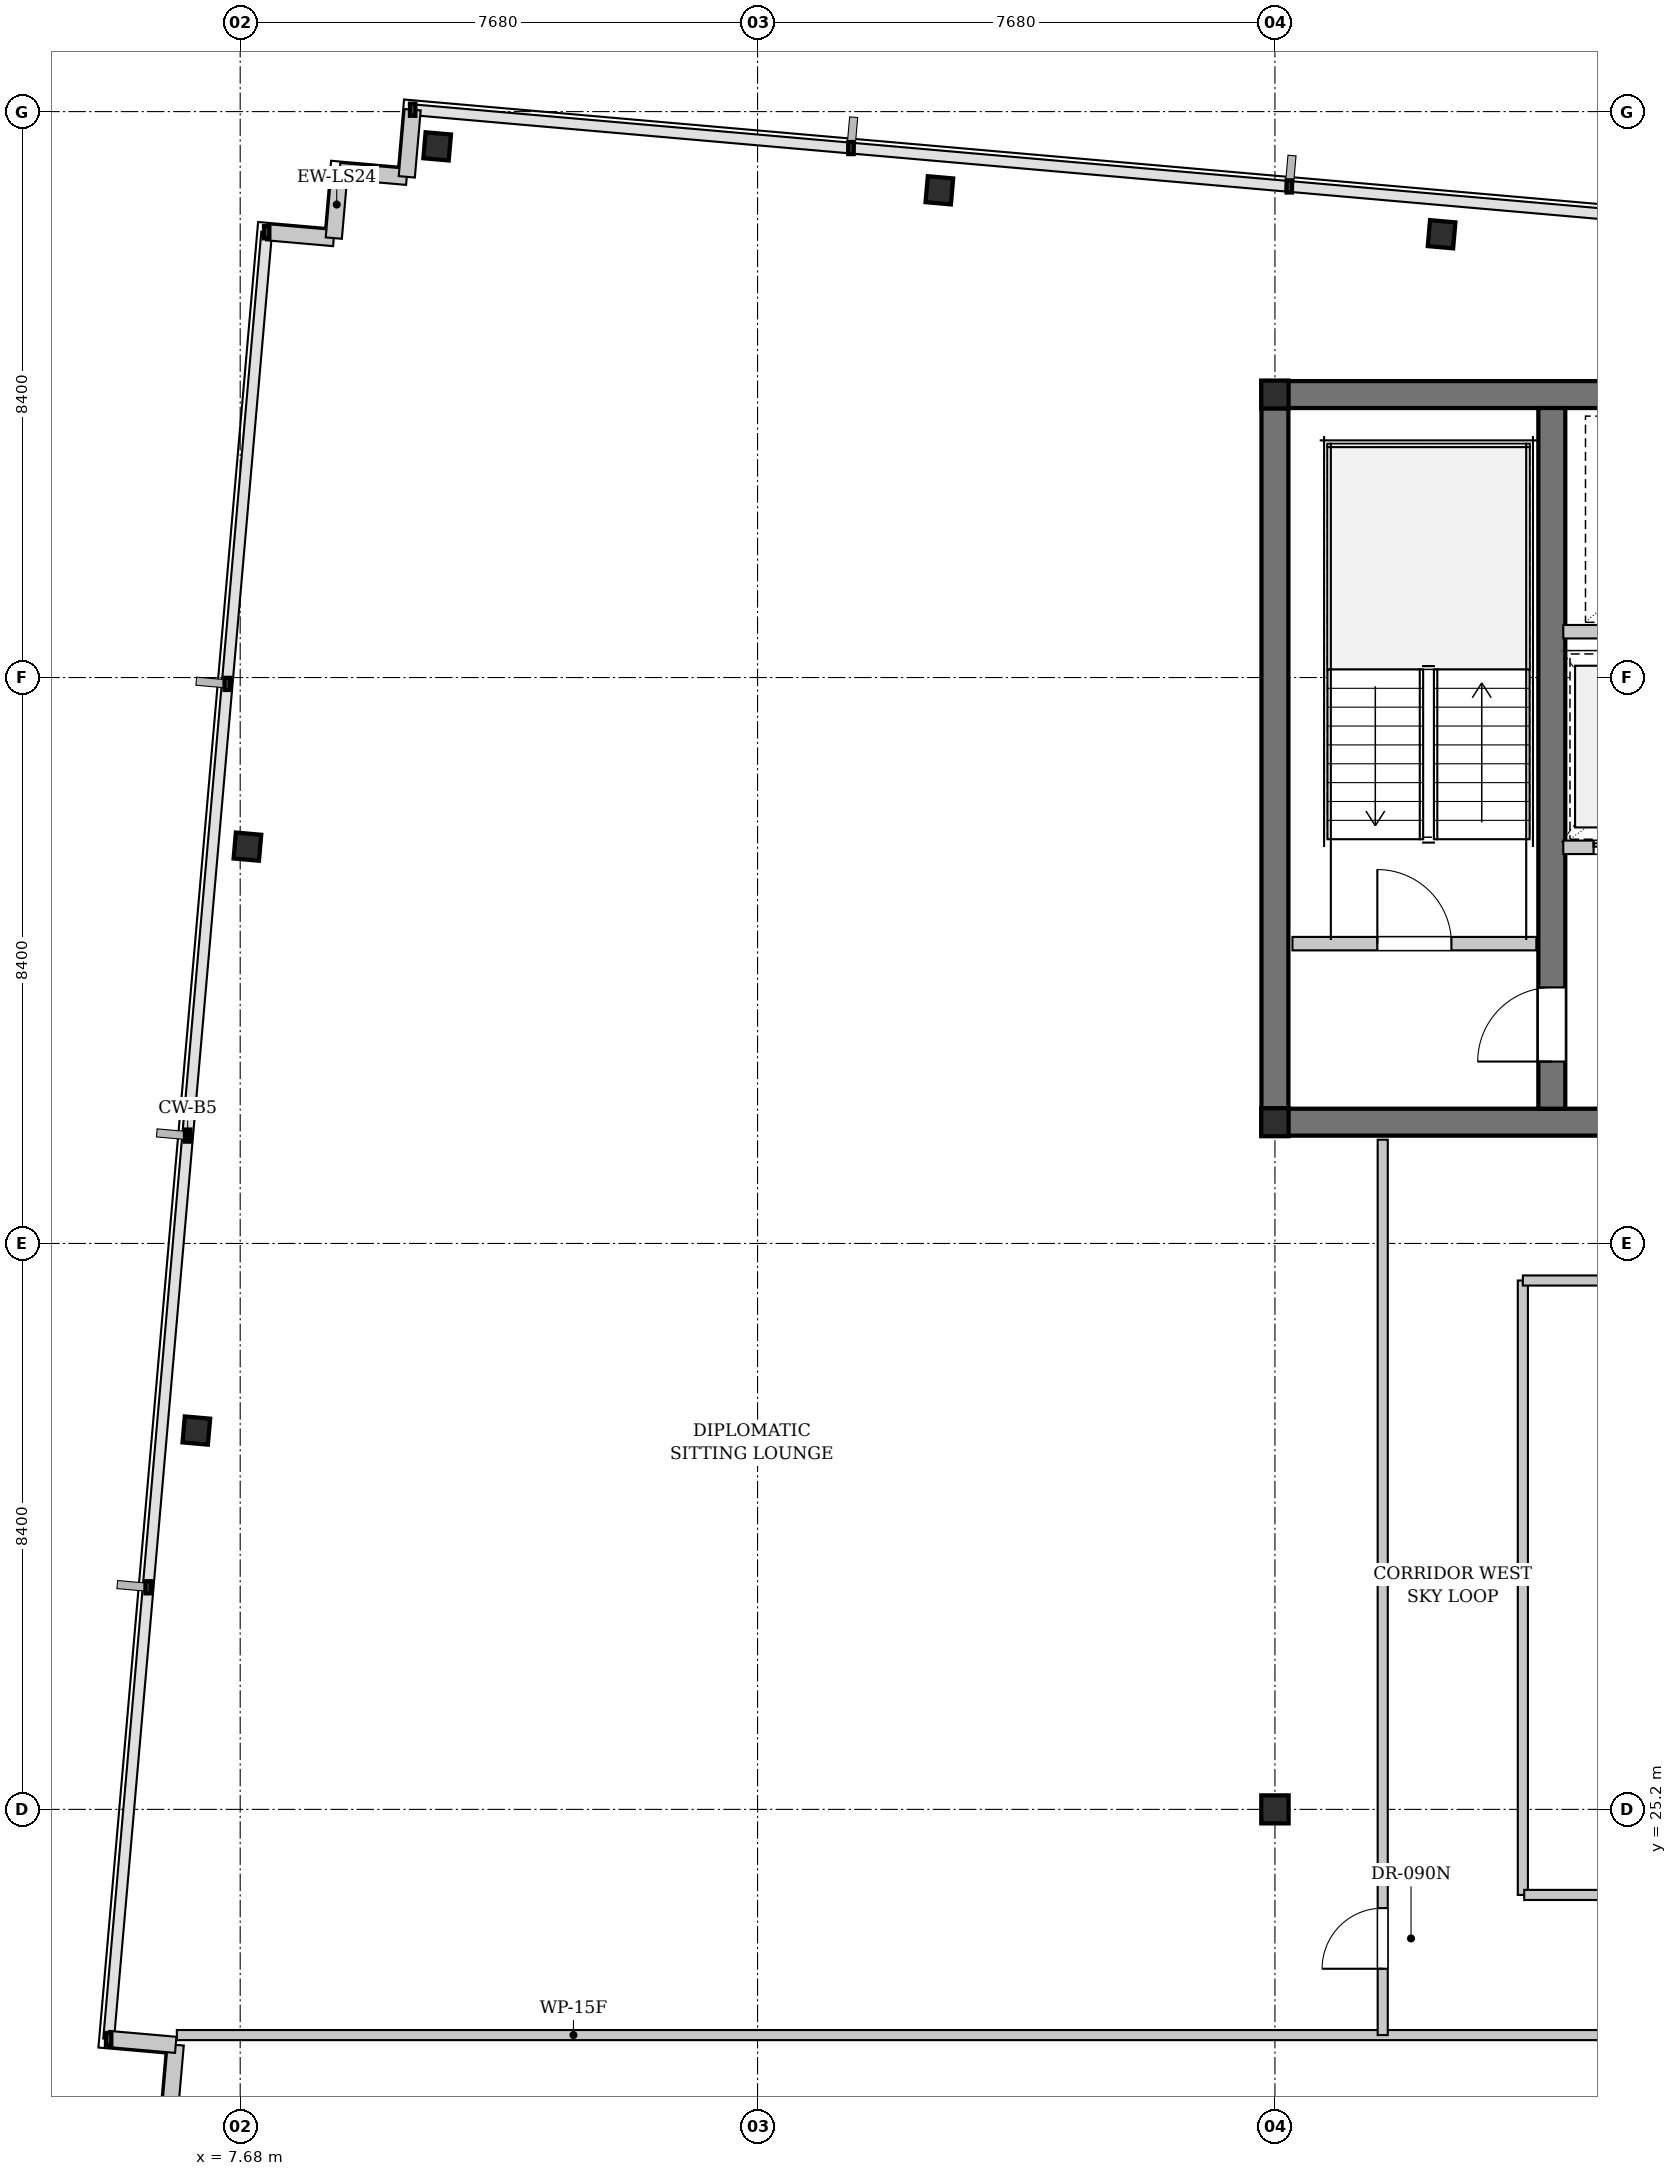
"""IFC4 building model, lengths in metres.
Left out: names, types, materials, properties, quantities, classifications, styles, units other than length and angle.
Written with IfcOpenShell. Run it as: python <this file> out.ifc"""

import sys

from ifc_helpers import new_model, si_unit, direction, frame, frame_2d, origin, origin_2d, place, context, subcontext, project, spatial, rectangle, i_section, extrude, element, fill, save


model = new_model("IFC4")
c1 = context("Model", 3, precision=1e-05, world=origin(), true_north=direction((0.0, 1.0)))
c2 = subcontext(c1, "Body", "Model", "MODEL_VIEW")
j1 = project(units=[si_unit("LENGTHUNIT", "METRE"), si_unit("PLANEANGLEUNIT", "RADIAN")], contexts=[c1])
p1 = place(None, origin())
s1 = spatial("IfcSite", under=j1, at=p1, CompositionType="ELEMENT")
p2 = place(p1, origin())
s2 = spatial("IfcBuilding", under=s1, at=p2, CompositionType="ELEMENT")
p3 = place(p2, frame((0.0, 0.0, 276.1)))
s3 = spatial("IfcBuildingStorey", under=s2, at=p3, CompositionType="ELEMENT", Elevation=276.1)
p4 = place(p3, frame((22.84, 46.2, 0.0), z_axis=(0.0, 0.0, 1.0), x_axis=(1.0, 0.0, 0.0)))
e1 = element("IfcWall", 1, at=p4, inside=s3, PredefinedType="SHEAR", context=c2, shape_type="SweptSolid", body=[
    extrude(rectangle(XDim=31.12, YDim=0.4, at=frame_2d((15.56, 0.0))), origin(), (0.0, 0.0, 1.0), 3.18),
])
p5 = place(p3, frame((22.84, 35.4, 0.0), z_axis=(0.0, 0.0, 1.0), x_axis=(1.0, 0.0, 0.0)))
e2 = element("IfcWall", 2, at=p5, inside=s3, PredefinedType="SHEAR", context=c2, shape_type="SweptSolid", body=[
    extrude(rectangle(XDim=5.36, YDim=0.4, at=frame_2d((2.68, 0.0))), origin(), (0.0, 0.0, 1.0), 3.18),
])
p6 = place(p3, frame((23.04, 35.6, 0.0), z_axis=(0.0, 0.0, 1.0), x_axis=(0.0, 1.0, 0.0)))
e3 = element("IfcWall", 3, at=p6, inside=s3, PredefinedType="SHEAR", context=c2, shape_type="SweptSolid", body=[
    extrude(rectangle(XDim=10.4, YDim=0.4, at=frame_2d((5.2, 0.0))), origin(), (0.0, 0.0, 1.0), 3.18),
])
p7 = place(p3, frame((27.15, 35.6, 0.0), z_axis=(0.0, 0.0, 1.0), x_axis=(0.0, 1.0, 0.0)))
e4 = element("IfcWall", 4, at=p7, inside=s3, PredefinedType="SHEAR", context=c2, shape_type="SweptSolid", body=[
    extrude(rectangle(XDim=10.4, YDim=0.4, at=frame_2d((5.2, 0.0))), origin(), (0.0, 0.0, 1.0), 3.18),
])
p8 = place(p7, frame((0.7, 0.0, 0.0)))
e5 = element("IfcOpeningElement", 5, at=p8, cuts=e4, PredefinedType="OPENING", context=c2, shape_type="SweptSolid", body=[
    extrude(rectangle(XDim=1.1, YDim=2.15, at=frame_2d((0.55, 1.075))), frame((0.0, 0.21, 0.0), z_axis=(0.0, -1.0, 0.0), x_axis=(1.0, 0.0, 0.0)), (0.0, 0.0, 1.0), 0.42),
])
for number, where, z_axis, x_axis in (
    (6, (23.04, 35.4, 0.0), (0.0, 0.0, 1.0), (1.0, 0.0, 0.0)),
    (7, (23.04, 46.2, 0.0), (0.0, 0.0, 1.0), (1.0, 0.0, 0.0)),
    (8, (23.04, 25.2, 0.0), (0.0, 0.0, 1.0), (1.0, 0.0, 0.0)),
):
    element("IfcColumn", number, at=place(p3, frame(where, z_axis=z_axis, x_axis=x_axis)), inside=s3, PredefinedType="COLUMN", context=c2, shape_type="SweptSolid", body=[
        extrude(i_section(OverallWidth=0.406, OverallDepth=0.416, WebThickness=0.03, FlangeThickness=0.048, FilletRadius=0.015, at=origin_2d()), origin(), (0.0, 0.0, 1.0), 3.4),
    ])
for number, where, z_axis, x_axis in (
    (9, (10.604, 49.884, 0.0), (0.0, 0.0, 1.0), (0.996, -0.087, 0.0)),
    (10, (18.059, 49.232, 0.0), (0.0, 0.0, 1.0), (0.996, -0.087, 0.0)),
    (11, (25.514, 48.58, 0.0), (0.0, 0.0, 1.0), (0.996, -0.087, 0.0)),
    (12, (7.029, 30.823, 0.0), (0.0, 0.0, 1.0), (0.996, -0.087, 0.0)),
    (13, (7.787, 39.49, 0.0), (0.0, 0.0, 1.0), (0.996, -0.087, 0.0)),
):
    element("IfcColumn", number, at=place(p3, frame(where, z_axis=z_axis, x_axis=x_axis)), inside=s3, PredefinedType="COLUMN", context=c2, shape_type="SweptSolid", body=[
        extrude(i_section(OverallWidth=0.378, OverallDepth=0.387, WebThickness=0.021, FlangeThickness=0.033, FilletRadius=0.015, at=origin_2d()), origin(), (0.0, 0.0, 1.0), 3.4),
    ])
for number, where, z_axis, x_axis in (
    (14, (6.636, 20.709, 0.0), (0.0, 0.0, 1.0), (0.087, 0.996, 0.0)),
    (15, (6.723, 21.705, 0.0), (0.0, 0.0, 1.0), (-0.996, 0.087, 0.0)),
    (16, (8.073, 48.61, 0.0), (0.0, 0.0, 1.0), (0.996, -0.087, 0.0)),
    (17, (9.07, 48.522, 0.0), (0.0, 0.0, 1.0), (0.087, 0.996, 0.0)),
):
    element("IfcWall", number, at=place(p3, frame(where, z_axis=z_axis, x_axis=x_axis)), inside=s3, PredefinedType="SOLIDWALL", context=c2, shape_type="SweptSolid", body=[
        extrude(rectangle(XDim=1.0, YDim=0.24, at=frame_2d((0.5, 0.0))), origin(), (0.0, 0.0, 1.0), 3.18),
    ])
for number, where, z_axis, x_axis in (
    (18, (9.157, 49.519, 0.0), (0.0, 0.0, 1.0), (0.996, -0.087, 0.0)),
    (19, (10.153, 49.432, 0.0), (0.0, 0.0, 1.0), (0.087, 0.996, 0.0)),
):
    element("IfcWall", number, at=place(p3, frame(where, z_axis=z_axis, x_axis=x_axis)), inside=s3, PredefinedType="SOLIDWALL", context=c2, shape_type="SweptSolid", body=[
        extrude(rectangle(XDim=1.0, YDim=0.24, at=frame_2d((0.5, 0.0))), origin(), (0.0, 0.0, 1.0), 3.18),
    ])
p9 = place(p3, frame((23.3, 38.05, 0.0), z_axis=(0.0, 0.0, 1.0), x_axis=(1.0, 0.0, 0.0)))
e20 = element("IfcWall", 20, at=p9, inside=s3, PredefinedType="PARTITIONING", context=c2, shape_type="SweptSolid", body=[
    extrude(rectangle(XDim=3.62, YDim=0.2, at=frame_2d((1.81, 0.0))), origin(), (0.0, 0.0, 1.0), 3.18),
])
p10 = place(p9, frame((1.26, 0.0, 0.0)))
e21 = element("IfcOpeningElement", 21, at=p10, cuts=e20, PredefinedType="OPENING", context=c2, shape_type="SweptSolid", body=[
    extrude(rectangle(XDim=1.1, YDim=2.15, at=frame_2d((0.55, 1.075))), frame((0.0, 0.11, 0.0), z_axis=(0.0, -1.0, 0.0), x_axis=(1.0, 0.0, 0.0)), (0.0, 0.0, 1.0), 0.22),
])
p11 = place(p3, frame((27.32, 39.48, 0.0), z_axis=(0.0, 0.0, 1.0), x_axis=(1.0, 0.0, 0.0)))
e22 = element("IfcWall", 22, at=p11, inside=s3, PredefinedType="PARTITIONING", context=c2, shape_type="SweptSolid", body=[
    extrude(rectangle(XDim=3.94, YDim=0.2, at=frame_2d((1.97, 0.0))), origin(), (0.0, 0.0, 1.0), 3.18),
])
p12 = place(p11, frame((0.45, 0.0, 0.0)))
e23 = element("IfcOpeningElement", 23, at=p12, cuts=e22, PredefinedType="OPENING", context=c2, shape_type="SweptSolid", body=[
    extrude(rectangle(XDim=1.1, YDim=2.2, at=frame_2d((0.55, 1.1))), frame((0.0, 0.11, 0.0), z_axis=(0.0, -1.0, 0.0), x_axis=(1.0, 0.0, 0.0)), (0.0, 0.0, 1.0), 0.22),
])
p13 = place(p11, frame((2.41, 0.0, 0.0)))
e24 = element("IfcOpeningElement", 24, at=p13, cuts=e22, PredefinedType="OPENING", context=c2, shape_type="SweptSolid", body=[
    extrude(rectangle(XDim=1.1, YDim=2.2, at=frame_2d((0.55, 1.1))), frame((0.0, 0.11, 0.0), z_axis=(0.0, -1.0, 0.0), x_axis=(1.0, 0.0, 0.0)), (0.0, 0.0, 1.0), 0.22),
])
p14 = place(p3, frame((27.32, 42.68, 0.0), z_axis=(0.0, 0.0, 1.0), x_axis=(1.0, 0.0, 0.0)))
e25 = element("IfcWall", 25, at=p14, inside=s3, PredefinedType="PARTITIONING", context=c2, shape_type="SweptSolid", body=[
    extrude(rectangle(XDim=5.33, YDim=0.2, at=frame_2d((2.665, 0.0))), origin(), (0.0, 0.0, 1.0), 3.18),
])
p15 = place(p14, frame((4.18, 0.0, 0.0)))
e26 = element("IfcOpeningElement", 26, at=p15, cuts=e25, PredefinedType="OPENING", context=c2, shape_type="SweptSolid", body=[
    extrude(rectangle(XDim=0.9, YDim=2.15, at=frame_2d((0.45, 1.075))), frame((0.0, 0.11, 0.0), z_axis=(0.0, -1.0, 0.0), x_axis=(1.0, 0.0, 0.0)), (0.0, 0.0, 1.0), 0.22),
])
p16 = place(p3, frame((6.74, 21.85, 0.0), z_axis=(0.0, 0.0, 1.0), x_axis=(1.0, 0.0, 0.0)))
e27 = element("IfcWall", 27, at=p16, inside=s3, PredefinedType="PARTITIONING", context=c2, shape_type="SweptSolid", body=[
    extrude(rectangle(XDim=26.76, YDim=0.15, at=frame_2d((13.38, 0.0))), origin(), (0.0, 0.0, 1.0), 2.575),
])
p17 = place(p16, frame((21.965, 0.0, 0.0)))
e28 = element("IfcOpeningElement", 28, at=p17, cuts=e27, PredefinedType="OPENING", context=c2, shape_type="SweptSolid", body=[
    extrude(rectangle(XDim=0.95, YDim=2.15, at=frame_2d((0.475, 1.075))), frame((0.0, 0.085, 0.0), z_axis=(0.0, -1.0, 0.0), x_axis=(1.0, 0.0, 0.0)), (0.0, 0.0, 1.0), 0.17),
])
p18 = place(p3, frame((24.64, 21.85, 0.0), z_axis=(0.0, 0.0, 1.0), x_axis=(0.0, 1.0, 0.0)))
e29 = element("IfcWall", 29, at=p18, inside=s3, PredefinedType="PARTITIONING", context=c2, shape_type="SweptSolid", body=[
    extrude(rectangle(XDim=13.29, YDim=0.15, at=frame_2d((6.645, 0.0))), origin(), (0.0, 0.0, 1.0), 3.18),
])
p19 = place(p18, frame((0.984, 0.0, 0.0)))
e30 = element("IfcOpeningElement", 30, at=p19, cuts=e29, PredefinedType="OPENING", context=c2, shape_type="SweptSolid", body=[
    extrude(rectangle(XDim=0.9, YDim=2.15, at=frame_2d((0.45, 1.075))), frame((0.0, 0.085, 0.0), z_axis=(0.0, -1.0, 0.0), x_axis=(1.0, 0.0, 0.0)), (0.0, 0.0, 1.0), 0.17),
])
p20 = place(p3, frame((26.72, 23.93, 0.0), z_axis=(0.0, 0.0, 1.0), x_axis=(0.0, 1.0, 0.0)))
e31 = element("IfcWall", 31, at=p20, inside=s3, PredefinedType="PARTITIONING", context=c2, shape_type="SweptSolid", body=[
    extrude(rectangle(XDim=9.12, YDim=0.15, at=frame_2d((4.56, 0.0))), origin(), (0.0, 0.0, 1.0), 3.18),
])
p21 = place(p3, frame((26.72, 33.05, 0.0), z_axis=(0.0, 0.0, 1.0), x_axis=(1.0, 0.0, 0.0)))
e32 = element("IfcWall", 32, at=p21, inside=s3, PredefinedType="PARTITIONING", context=c2, shape_type="SweptSolid", body=[
    extrude(rectangle(XDim=6.78, YDim=0.15, at=frame_2d((3.39, 0.0))), origin(), (0.0, 0.0, 1.0), 3.18),
])
p22 = place(p3, frame((26.74, 23.93, 0.0), z_axis=(0.0, 0.0, 1.0), x_axis=(1.0, 0.0, 0.0)))
e33 = element("IfcWall", 33, at=p22, inside=s3, PredefinedType="PARTITIONING", context=c2, shape_type="SweptSolid", body=[
    extrude(rectangle(XDim=6.75, YDim=0.15, at=frame_2d((3.375, 0.0))), origin(), (0.0, 0.0, 1.0), 3.18),
])
p23 = place(p22, frame((1.503, 0.0, 0.0)))
e34 = element("IfcOpeningElement", 34, at=p23, cuts=e33, PredefinedType="OPENING", context=c2, shape_type="SweptSolid", body=[
    extrude(rectangle(XDim=0.9, YDim=2.15, at=frame_2d((0.45, 1.075))), frame((0.0, 0.085, 0.0), z_axis=(0.0, -1.0, 0.0), x_axis=(1.0, 0.0, 0.0)), (0.0, 0.0, 1.0), 0.17),
])
p24 = place(p10, origin())
e35 = element("IfcDoor", 35, at=p24, inside=s3, OperationType="SINGLE_SWING_LEFT", PredefinedType="DOOR", context=c2, shape_type="SweptSolid", body=[
    extrude(rectangle(XDim=1.1, YDim=2.15, at=frame_2d((0.55, 1.075))), frame((0.0, 0.025, 0.0), z_axis=(0.0, -1.0, 0.0), x_axis=(1.0, 0.0, 0.0)), (0.0, 0.0, 1.0), 0.05),
])
fill(e21, e35)
p25 = place(p12, origin())
e36 = element("IfcDoor", 36, at=p25, inside=s3, OperationType="DOUBLE_DOOR_SLIDING", PredefinedType="DOOR", context=c2, shape_type="SweptSolid", body=[
    extrude(rectangle(XDim=1.1, YDim=2.2, at=frame_2d((0.55, 1.1))), frame((0.0, 0.025, 0.0), z_axis=(0.0, -1.0, 0.0), x_axis=(1.0, 0.0, 0.0)), (0.0, 0.0, 1.0), 0.05),
])
fill(e23, e36)
p26 = place(p19, origin())
e37 = element("IfcDoor", 37, at=p26, inside=s3, OperationType="SINGLE_SWING_LEFT", PredefinedType="DOOR", context=c2, shape_type="SweptSolid", body=[
    extrude(rectangle(XDim=0.9, YDim=2.15, at=frame_2d((0.45, 1.075))), frame((0.0, 0.025, 0.0), z_axis=(0.0, -1.0, 0.0), x_axis=(1.0, 0.0, 0.0)), (0.0, 0.0, 1.0), 0.05),
])
fill(e30, e37)
p27 = place(p8, origin())
e38 = element("IfcDoor", 38, at=p27, inside=s3, OperationType="SINGLE_SWING_LEFT", PredefinedType="DOOR", context=c2, shape_type="SweptSolid", body=[
    extrude(rectangle(XDim=1.1, YDim=2.15, at=frame_2d((0.55, 1.075))), frame((0.0, 0.025, 0.0), z_axis=(0.0, -1.0, 0.0), x_axis=(1.0, 0.0, 0.0)), (0.0, 0.0, 1.0), 0.05),
])
fill(e5, e38)
save(model, sys.argv[1])
